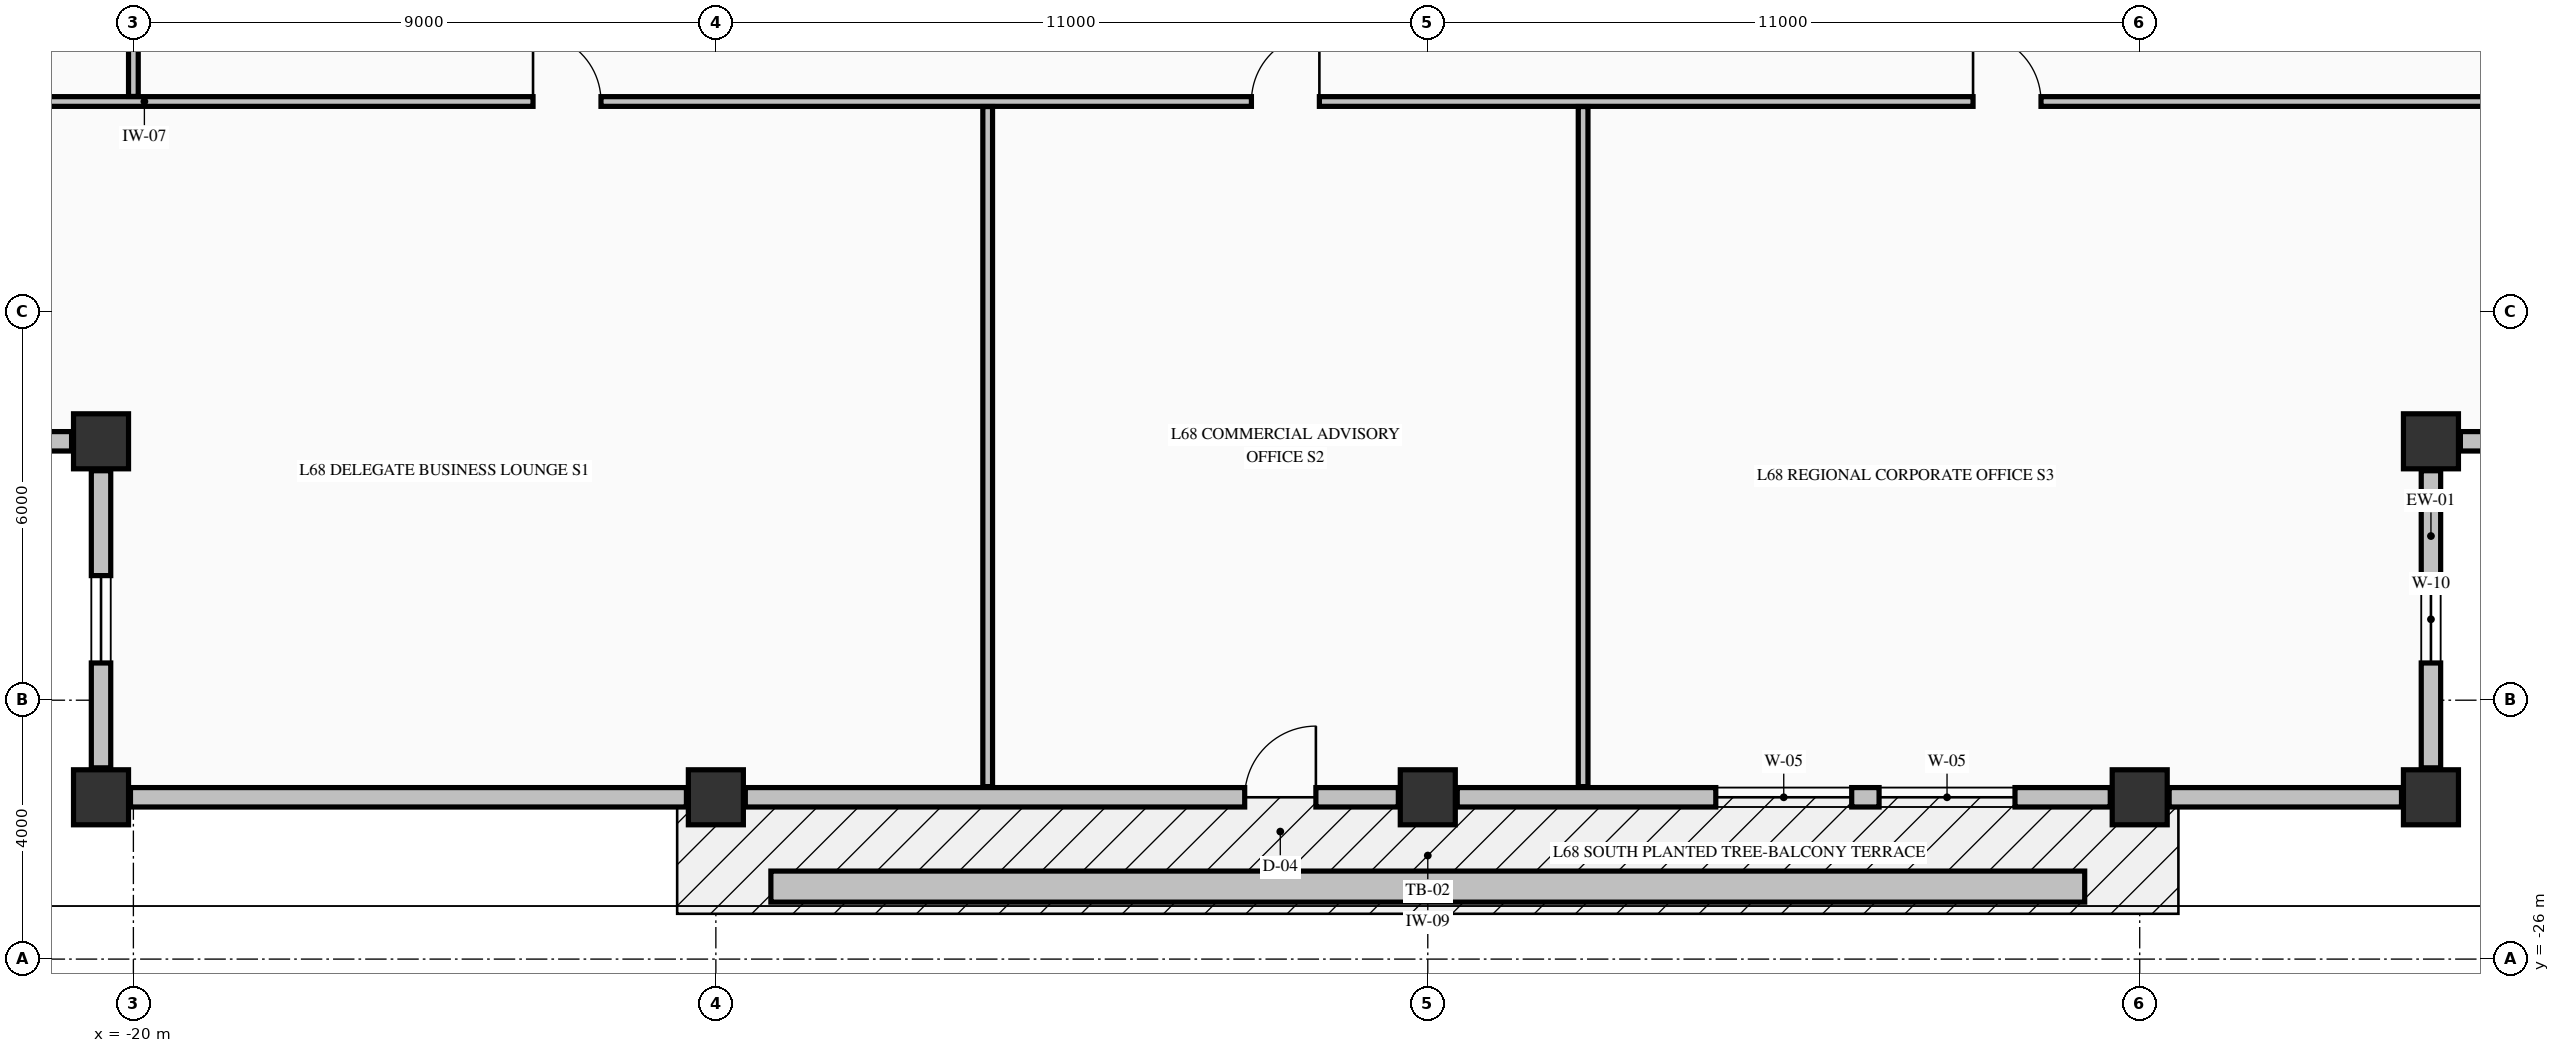
"""IFC4 building model, lengths in metres.
Left out: names, types, materials, properties, quantities, classifications, styles, units other than length and angle.
Written with IfcOpenShell. Run it as: python <this file> out.ifc"""

import sys

from ifc_helpers import new_model, si_unit, direction, frame, frame_2d, origin, origin_2d, place, context, subcontext, project, spatial, rectangle, extrude, element, fill, save


model = new_model("IFC4")
c1 = context("Model", 3, precision=1e-05, world=origin(), true_north=direction((0.0, 1.0)))
c2 = subcontext(c1, "Body", "Model", "MODEL_VIEW")
j1 = project(units=[si_unit("LENGTHUNIT", "METRE"), si_unit("PLANEANGLEUNIT", "RADIAN")], contexts=[c1])
p1 = place(None, origin())
s1 = spatial("IfcSite", under=j1, at=p1, CompositionType="ELEMENT")
p2 = place(p1, origin())
s2 = spatial("IfcBuilding", under=s1, at=p2, CompositionType="ELEMENT")
p3 = place(p2, frame((0.0, 0.0, 257.66)))
s3 = spatial("IfcBuildingStorey", under=s2, at=p3, CompositionType="ELEMENT", Elevation=257.66)
for number, where, z_axis, x_axis in (
    (1, (-20.5, -23.5, -0.25), (0.0, 0.0, 1.0), (1.0, 0.0, 0.0)),
    (2, (-11.0, -23.5, -0.25), (0.0, 0.0, 1.0), (1.0, 0.0, 0.0)),
    (3, (0.0, -23.5, -0.25), (0.0, 0.0, 1.0), (1.0, 0.0, 0.0)),
    (4, (11.0, -23.5, -0.25), (0.0, 0.0, 1.0), (1.0, 0.0, 0.0)),
    (5, (15.5, -23.5, -0.25), (0.0, 0.0, 1.0), (1.0, 0.0, 0.0)),
    (6, (-20.5, -18.0, -0.25), (0.0, 0.0, 1.0), (1.0, 0.0, 0.0)),
    (7, (15.5, -18.0, -0.25), (0.0, 0.0, 1.0), (1.0, 0.0, 0.0)),
):
    element("IfcColumn", number, at=place(p3, frame(where, z_axis=z_axis, x_axis=x_axis)), inside=s3, PredefinedType="COLUMN", context=c2, shape_type="SweptSolid", body=[
        extrude(rectangle(XDim=0.85, YDim=0.85, at=origin_2d()), origin(), (0.0, 0.0, 1.0), 3.23),
    ])
p4 = place(p3, frame((15.5, -23.045, 0.0), z_axis=(0.0, 0.0, 1.0), x_axis=(0.0, 1.0, 0.0)))
e8 = element("IfcWall", 8, at=p4, inside=s3, PredefinedType="STANDARD", context=c2, shape_type="SweptSolid", body=[
    extrude(rectangle(XDim=4.59, YDim=0.3, at=frame_2d((2.295, 0.0))), origin(), (0.0, 0.0, 1.0), 2.372),
])
p5 = place(p4, frame((1.62, 0.0, 0.68)))
e9 = element("IfcOpeningElement", 9, at=p5, cuts=e8, PredefinedType="OPENING", context=c2, shape_type="SweptSolid", body=[
    extrude(rectangle(XDim=1.35, YDim=1.42, at=frame_2d((0.675, 0.71))), frame((0.0, 0.16, 0.0), z_axis=(0.0, -1.0, 0.0), x_axis=(1.0, 0.0, 0.0)), (0.0, 0.0, 1.0), 0.32),
])
p6 = place(p3, frame((15.955, -18.0, 0.0), z_axis=(0.0, 0.0, 1.0), x_axis=(1.0, 0.0, 0.0)))
e10 = element("IfcWall", 10, at=p6, inside=s3, PredefinedType="STANDARD", context=c2, shape_type="SweptSolid", body=[
    extrude(rectangle(XDim=4.59, YDim=0.3, at=frame_2d((2.295, 0.0))), origin(), (0.0, 0.0, 1.0), 2.372),
])
p7 = place(p6, frame((1.62, 0.0, 0.68)))
e11 = element("IfcOpeningElement", 11, at=p7, cuts=e10, PredefinedType="OPENING", context=c2, shape_type="SweptSolid", body=[
    extrude(rectangle(XDim=1.35, YDim=1.42, at=frame_2d((0.675, 0.71))), frame((0.0, 0.16, 0.0), z_axis=(0.0, -1.0, 0.0), x_axis=(1.0, 0.0, 0.0)), (0.0, 0.0, 1.0), 0.32),
])
p8 = place(p3, frame((-25.545, -18.0, 0.0), z_axis=(0.0, 0.0, 1.0), x_axis=(1.0, 0.0, 0.0)))
e12 = element("IfcWall", 12, at=p8, inside=s3, PredefinedType="STANDARD", context=c2, shape_type="SweptSolid", body=[
    extrude(rectangle(XDim=4.59, YDim=0.3, at=frame_2d((2.295, 0.0))), origin(), (0.0, 0.0, 1.0), 2.372),
])
p9 = place(p8, frame((1.62, 0.0, 0.68)))
e13 = element("IfcOpeningElement", 13, at=p9, cuts=e12, PredefinedType="OPENING", context=c2, shape_type="SweptSolid", body=[
    extrude(rectangle(XDim=1.35, YDim=1.42, at=frame_2d((0.675, 0.71))), frame((0.0, 0.16, 0.0), z_axis=(0.0, -1.0, 0.0), x_axis=(1.0, 0.0, 0.0)), (0.0, 0.0, 1.0), 0.32),
])
p10 = place(p3, frame((-20.5, -18.455, 0.0), z_axis=(0.0, 0.0, 1.0), x_axis=(0.0, -1.0, 0.0)))
e14 = element("IfcWall", 14, at=p10, inside=s3, PredefinedType="STANDARD", context=c2, shape_type="SweptSolid", body=[
    extrude(rectangle(XDim=4.59, YDim=0.3, at=frame_2d((2.295, 0.0))), origin(), (0.0, 0.0, 1.0), 2.372),
])
p11 = place(p10, frame((1.62, 0.0, 0.68)))
e15 = element("IfcOpeningElement", 15, at=p11, cuts=e14, PredefinedType="OPENING", context=c2, shape_type="SweptSolid", body=[
    extrude(rectangle(XDim=1.35, YDim=1.42, at=frame_2d((0.675, 0.71))), frame((0.0, 0.16, 0.0), z_axis=(0.0, -1.0, 0.0), x_axis=(1.0, 0.0, 0.0)), (0.0, 0.0, 1.0), 0.32),
])
p12 = place(p3, frame((-20.045, -23.5, 0.0), z_axis=(0.0, 0.0, 1.0), x_axis=(1.0, 0.0, 0.0)))
e16 = element("IfcWall", 16, at=p12, inside=s3, PredefinedType="STANDARD", context=c2, shape_type="SweptSolid", body=[
    extrude(rectangle(XDim=8.59, YDim=0.3, at=frame_2d((4.295, 0.0))), origin(), (0.0, 0.0, 1.0), 2.372),
])
p13 = place(p3, frame((-10.545, -23.5, 0.0), z_axis=(0.0, 0.0, 1.0), x_axis=(1.0, 0.0, 0.0)))
e17 = element("IfcWall", 17, at=p13, inside=s3, PredefinedType="STANDARD", context=c2, shape_type="SweptSolid", body=[
    extrude(rectangle(XDim=10.09, YDim=0.3, at=frame_2d((5.045, 0.0))), origin(), (0.0, 0.0, 1.0), 2.372),
])
p14 = place(p13, frame((7.716, 0.0, 0.0)))
e18 = element("IfcOpeningElement", 18, at=p14, cuts=e17, PredefinedType="OPENING", context=c2, shape_type="SweptSolid", body=[
    extrude(rectangle(XDim=1.1, YDim=2.15, at=frame_2d((0.55, 1.075))), frame((0.0, 0.16, 0.0), z_axis=(0.0, -1.0, 0.0), x_axis=(1.0, 0.0, 0.0)), (0.0, 0.0, 1.0), 0.32),
])
p15 = place(p3, frame((0.455, -23.5, 0.0), z_axis=(0.0, 0.0, 1.0), x_axis=(1.0, 0.0, 0.0)))
e19 = element("IfcWall", 19, at=p15, inside=s3, PredefinedType="STANDARD", context=c2, shape_type="SweptSolid", body=[
    extrude(rectangle(XDim=10.09, YDim=0.3, at=frame_2d((5.045, 0.0))), origin(), (0.0, 0.0, 1.0), 2.372),
])
p16 = place(p15, frame((3.995, 0.0, 0.7)))
e20 = element("IfcOpeningElement", 20, at=p16, cuts=e19, PredefinedType="OPENING", context=c2, shape_type="SweptSolid", body=[
    extrude(rectangle(XDim=2.1, YDim=1.5, at=frame_2d((1.05, 0.75))), frame((0.0, 0.16, 0.0), z_axis=(0.0, -1.0, 0.0), x_axis=(1.0, 0.0, 0.0)), (0.0, 0.0, 1.0), 0.32),
])
p17 = place(p15, frame((6.518, 0.0, 0.7)))
e21 = element("IfcOpeningElement", 21, at=p17, cuts=e19, PredefinedType="OPENING", context=c2, shape_type="SweptSolid", body=[
    extrude(rectangle(XDim=2.1, YDim=1.5, at=frame_2d((1.05, 0.75))), frame((0.0, 0.16, 0.0), z_axis=(0.0, -1.0, 0.0), x_axis=(1.0, 0.0, 0.0)), (0.0, 0.0, 1.0), 0.32),
])
p18 = place(p3, frame((11.455, -23.5, 0.0), z_axis=(0.0, 0.0, 1.0), x_axis=(1.0, 0.0, 0.0)))
e22 = element("IfcWall", 22, at=p18, inside=s3, PredefinedType="STANDARD", context=c2, shape_type="SweptSolid", body=[
    extrude(rectangle(XDim=3.59, YDim=0.3, at=frame_2d((1.795, 0.0))), origin(), (0.0, 0.0, 1.0), 2.372),
])
p19 = place(p3, frame((-25.835, -12.75, 0.0), z_axis=(0.0, 0.0, 1.0), x_axis=(1.0, 0.0, 0.0)))
e23 = element("IfcWall", 23, at=p19, inside=s3, PredefinedType="PARTITIONING", context=c2, shape_type="SweptSolid", body=[
    extrude(rectangle(XDim=45.91, YDim=0.15, at=frame_2d((22.955, 0.0))), origin(), (0.0, 0.0, 1.0), 2.98),
])
p20 = place(p19, frame((12.01, 0.0, 0.0)))
e24 = element("IfcOpeningElement", 24, at=p20, cuts=e23, PredefinedType="OPENING", context=c2, shape_type="SweptSolid", body=[
    extrude(rectangle(XDim=1.05, YDim=2.15, at=frame_2d((0.525, 1.075))), frame((0.0, 0.085, 0.0), z_axis=(0.0, -1.0, 0.0), x_axis=(1.0, 0.0, 0.0)), (0.0, 0.0, 1.0), 0.17),
])
p21 = place(p19, frame((23.11, 0.0, 0.0)))
e25 = element("IfcOpeningElement", 25, at=p21, cuts=e23, PredefinedType="OPENING", context=c2, shape_type="SweptSolid", body=[
    extrude(rectangle(XDim=1.05, YDim=2.15, at=frame_2d((0.525, 1.075))), frame((0.0, 0.085, 0.0), z_axis=(0.0, -1.0, 0.0), x_axis=(1.0, 0.0, 0.0)), (0.0, 0.0, 1.0), 0.17),
])
p22 = place(p19, frame((34.26, 0.0, 0.0)))
e26 = element("IfcOpeningElement", 26, at=p22, cuts=e23, PredefinedType="OPENING", context=c2, shape_type="SweptSolid", body=[
    extrude(rectangle(XDim=1.05, YDim=2.15, at=frame_2d((0.525, 1.075))), frame((0.0, 0.085, 0.0), z_axis=(0.0, -1.0, 0.0), x_axis=(1.0, 0.0, 0.0)), (0.0, 0.0, 1.0), 0.17),
])
p23 = place(p3, frame((-20.0, -12.672, 0.0), z_axis=(0.0, 0.0, 1.0), x_axis=(0.0, 1.0, 0.0)))
e27 = element("IfcWall", 27, at=p23, inside=s3, PredefinedType="PARTITIONING", context=c2, shape_type="SweptSolid", body=[
    extrude(rectangle(XDim=2.366, YDim=0.15, at=frame_2d((1.183, 0.0))), origin(), (0.0, 0.0, 1.0), 2.98),
])
p24 = place(p23, frame((0.847, 0.0, 0.0)))
e28 = element("IfcOpeningElement", 28, at=p24, cuts=e27, PredefinedType="OPENING", context=c2, shape_type="SweptSolid", body=[
    extrude(rectangle(XDim=0.95, YDim=2.15, at=frame_2d((0.475, 1.075))), frame((0.0, 0.085, 0.0), z_axis=(0.0, -1.0, 0.0), x_axis=(1.0, 0.0, 0.0)), (0.0, 0.0, 1.0), 0.17),
])
for number, where, z_axis, x_axis in (
    (29, (-6.8, -23.335, 0.0), (0.0, 0.0, 1.0), (0.0, 1.0, 0.0)),
    (30, (2.4, -23.335, 0.0), (0.0, 0.0, 1.0), (0.0, 1.0, 0.0)),
):
    element("IfcWall", number, at=place(p3, frame(where, z_axis=z_axis, x_axis=x_axis)), inside=s3, PredefinedType="PARTITIONING", context=c2, shape_type="SweptSolid", body=[
        extrude(rectangle(XDim=10.507, YDim=0.15, at=frame_2d((5.253, 0.0))), origin(), (0.0, 0.0, 1.0), 2.98),
    ])
p25 = place(p3, frame((-10.15, -24.88, -0.04), z_axis=(0.0, 0.0, 1.0), x_axis=(1.0, 0.0, 0.0)))
e31 = element("IfcWall", 31, at=p25, inside=s3, PredefinedType="PARAPET", context=c2, shape_type="SweptSolid", body=[
    extrude(rectangle(XDim=20.3, YDim=0.48, at=frame_2d((10.15, 0.0))), origin(), (0.0, 0.0, 1.0), 0.52),
])
p26 = place(p5, origin())
e32 = element("IfcWindow", 32, at=p26, inside=s3, PartitioningType="SINGLE_PANEL", PredefinedType="WINDOW", context=c2, shape_type="SweptSolid", body=[
    extrude(rectangle(XDim=1.35, YDim=1.42, at=frame_2d((0.675, 0.71))), frame((0.0, 0.03, 0.0), z_axis=(0.0, -1.0, 0.0), x_axis=(1.0, 0.0, 0.0)), (0.0, 0.0, 1.0), 0.06),
])
fill(e9, e32)
p27 = place(p11, origin())
e33 = element("IfcWindow", 33, at=p27, inside=s3, PartitioningType="SINGLE_PANEL", PredefinedType="WINDOW", context=c2, shape_type="SweptSolid", body=[
    extrude(rectangle(XDim=1.35, YDim=1.42, at=frame_2d((0.675, 0.71))), frame((0.0, 0.03, 0.0), z_axis=(0.0, -1.0, 0.0), x_axis=(1.0, 0.0, 0.0)), (0.0, 0.0, 1.0), 0.06),
])
fill(e15, e33)
p28 = place(p14, origin())
e34 = element("IfcDoor", 34, at=p28, inside=s3, OperationType="SINGLE_SWING_RIGHT", PredefinedType="DOOR", context=c2, shape_type="SweptSolid", body=[
    extrude(rectangle(XDim=1.1, YDim=2.15, at=frame_2d((0.55, 1.075))), frame((0.0, 0.025, 0.0), z_axis=(0.0, -1.0, 0.0), x_axis=(1.0, 0.0, 0.0)), (0.0, 0.0, 1.0), 0.05),
])
fill(e18, e34)
p29 = place(p16, origin())
e35 = element("IfcWindow", 35, at=p29, inside=s3, PartitioningType="SINGLE_PANEL", PredefinedType="WINDOW", context=c2, shape_type="SweptSolid", body=[
    extrude(rectangle(XDim=2.1, YDim=1.5, at=frame_2d((1.05, 0.75))), frame((0.0, 0.03, 0.0), z_axis=(0.0, -1.0, 0.0), x_axis=(1.0, 0.0, 0.0)), (0.0, 0.0, 1.0), 0.06),
])
fill(e20, e35)
p30 = place(p17, origin())
e36 = element("IfcWindow", 36, at=p30, inside=s3, PartitioningType="SINGLE_PANEL", PredefinedType="WINDOW", context=c2, shape_type="SweptSolid", body=[
    extrude(rectangle(XDim=2.1, YDim=1.5, at=frame_2d((1.05, 0.75))), frame((0.0, 0.03, 0.0), z_axis=(0.0, -1.0, 0.0), x_axis=(1.0, 0.0, 0.0)), (0.0, 0.0, 1.0), 0.06),
])
fill(e21, e36)
p31 = place(p20, origin())
e37 = element("IfcDoor", 37, at=p31, inside=s3, OperationType="SINGLE_SWING_LEFT", PredefinedType="DOOR", context=c2, shape_type="SweptSolid", body=[
    extrude(rectangle(XDim=1.05, YDim=2.15, at=frame_2d((0.525, 1.075))), frame((0.0, 0.025, 0.0), z_axis=(0.0, -1.0, 0.0), x_axis=(1.0, 0.0, 0.0)), (0.0, 0.0, 1.0), 0.05),
])
fill(e24, e37)
p32 = place(p21, origin())
e38 = element("IfcDoor", 38, at=p32, inside=s3, OperationType="SINGLE_SWING_RIGHT", PredefinedType="DOOR", context=c2, shape_type="SweptSolid", body=[
    extrude(rectangle(XDim=1.05, YDim=2.15, at=frame_2d((0.525, 1.075))), frame((0.0, 0.025, 0.0), z_axis=(0.0, -1.0, 0.0), x_axis=(1.0, 0.0, 0.0)), (0.0, 0.0, 1.0), 0.05),
])
fill(e25, e38)
p33 = place(p22, origin())
e39 = element("IfcDoor", 39, at=p33, inside=s3, OperationType="SINGLE_SWING_LEFT", PredefinedType="DOOR", context=c2, shape_type="SweptSolid", body=[
    extrude(rectangle(XDim=1.05, YDim=2.15, at=frame_2d((0.525, 1.075))), frame((0.0, 0.025, 0.0), z_axis=(0.0, -1.0, 0.0), x_axis=(1.0, 0.0, 0.0)), (0.0, 0.0, 1.0), 0.05),
])
fill(e26, e39)
save(model, sys.argv[1])
